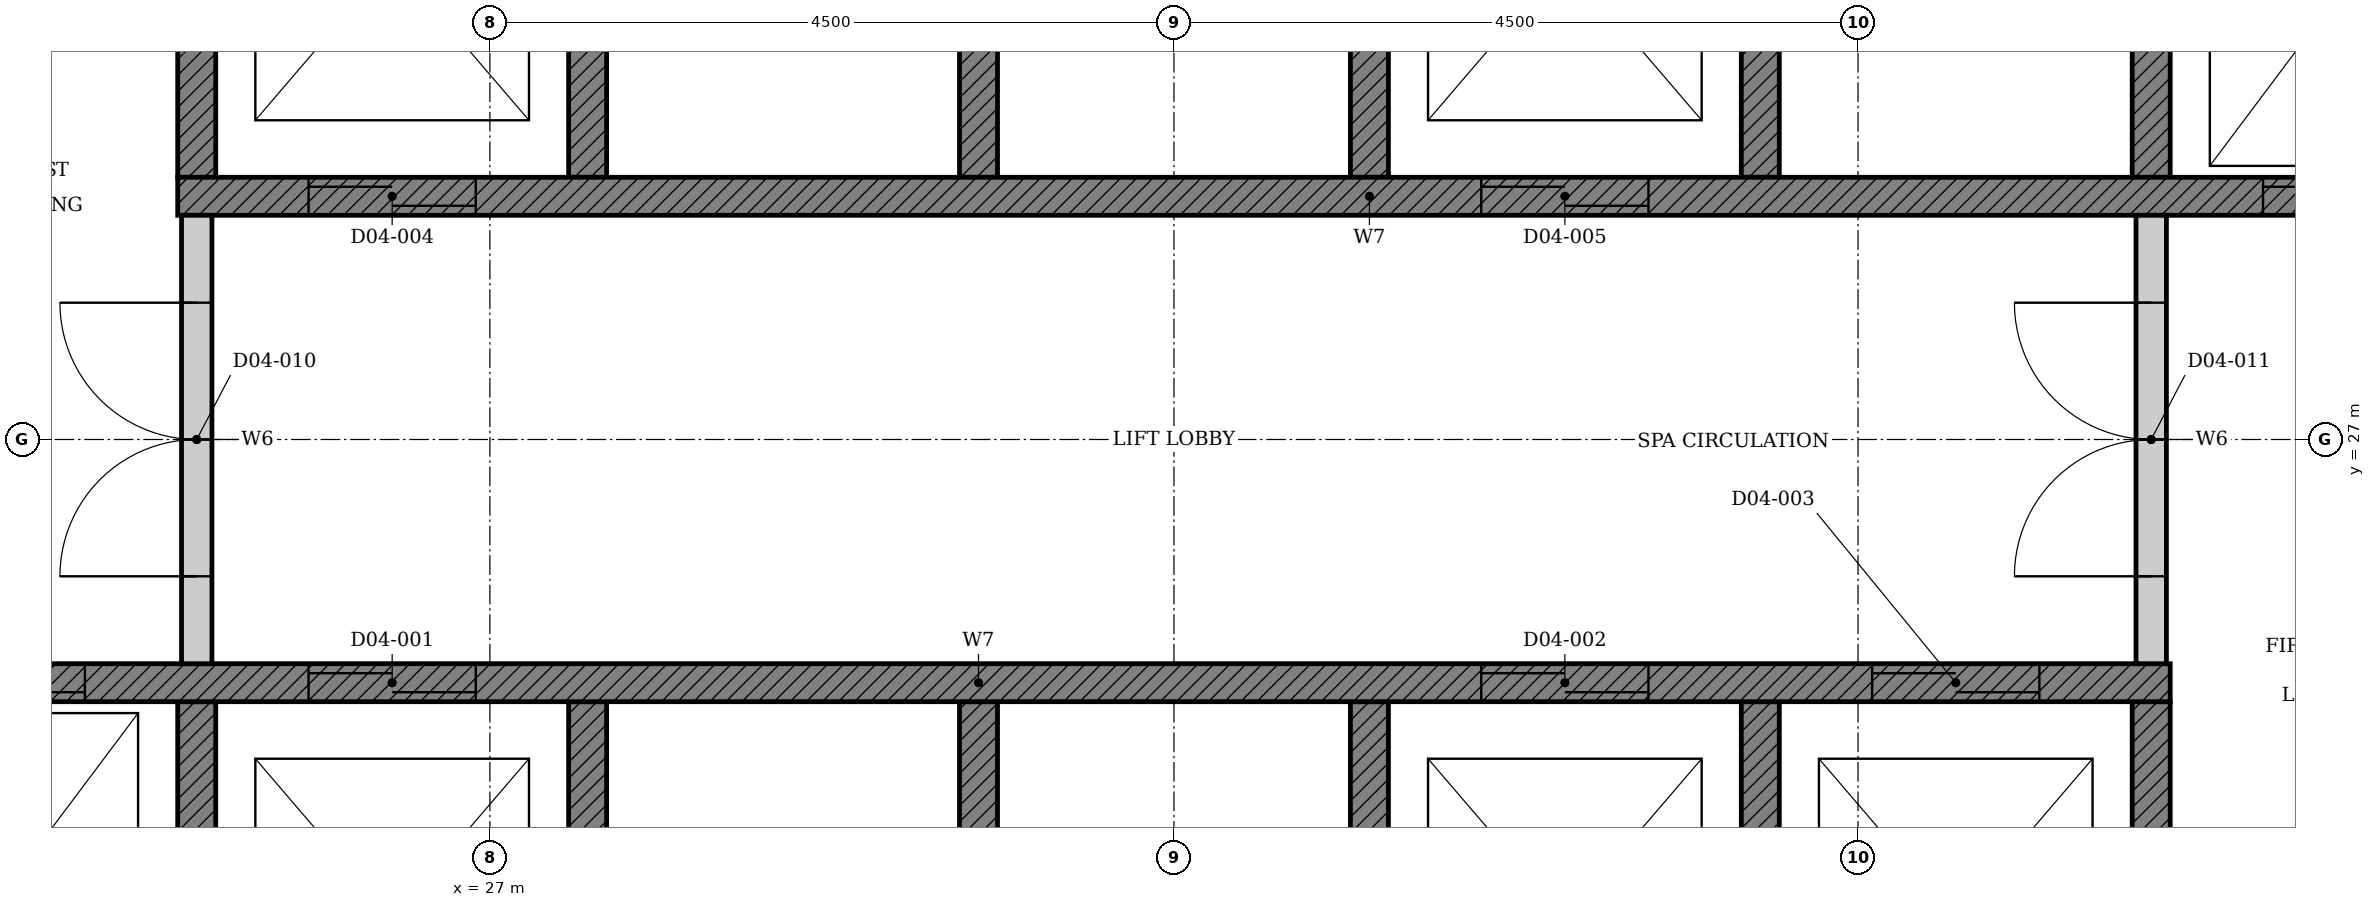
"""IFC4 building model, lengths in metres.
Left out: names, types, materials, properties, quantities, classifications, styles, units other than length and angle.
Written with IfcOpenShell. Run it as: python <this file> out.ifc"""

import sys

from ifc_helpers import new_model, si_unit, direction, frame, frame_2d, origin, place, context, subcontext, project, spatial, polyline, rectangle, outline, extrude, element, fill, save


model = new_model("IFC4")
c1 = context("Model", 3, precision=1e-05, world=origin(), true_north=direction((0.0, 1.0)))
c2 = subcontext(c1, "Body", "Model", "MODEL_VIEW")
j1 = project(units=[si_unit("LENGTHUNIT", "METRE"), si_unit("PLANEANGLEUNIT", "RADIAN")], contexts=[c1])
p1 = place(None, origin())
s1 = spatial("IfcSite", under=j1, at=p1, CompositionType="ELEMENT")
p2 = place(p1, origin())
s2 = spatial("IfcBuilding", under=s1, at=p2, CompositionType="ELEMENT")
p3 = place(p2, frame((0.0, 0.0, 24.0)))
s3 = spatial("IfcBuildingStorey", under=s2, at=p3, CompositionType="ELEMENT", Elevation=24.0)
p4 = place(p3, origin())
e1 = element("IfcWall", 1, at=p4, inside=s3, PredefinedType="SHEAR", context=c2, shape_type="SweptSolid", body=[
    extrude(outline(polyline([(22.375, 22.35), (38.053, 22.35), (38.053, 25.275), (37.803, 25.275), (37.803, 22.65), (35.482, 22.65), (35.482, 25.275), (35.232, 25.275), (35.232, 22.65), (32.911, 22.65), (32.911, 25.275), (32.661, 25.275), (32.661, 22.65), (30.339, 22.65), (30.339, 25.275), (30.089, 25.275), (30.089, 22.65), (27.768, 22.65), (27.768, 25.275), (27.518, 25.275), (27.518, 22.65), (25.197, 22.65), (25.197, 25.275), (24.947, 25.275), (24.947, 22.65), (22.625, 22.65), (22.625, 25.275), (22.375, 25.275), (22.375, 22.35)])), origin(), (0.0, 0.0, 1.0), 4.45),
])
p5 = place(p3, origin())
e2 = element("IfcWall", 2, at=p5, inside=s3, PredefinedType="SHEAR", context=c2, shape_type="SweptSolid", body=[
    extrude(outline(polyline([(24.947, 28.725), (25.197, 28.725), (25.197, 31.35), (27.518, 31.35), (27.518, 28.725), (27.768, 28.725), (27.768, 31.35), (30.089, 31.35), (30.089, 28.725), (30.339, 28.725), (30.339, 31.35), (32.661, 31.35), (32.661, 28.725), (32.911, 28.725), (32.911, 31.35), (35.232, 31.35), (35.232, 28.725), (35.482, 28.725), (35.482, 31.35), (37.803, 31.35), (37.803, 28.725), (38.053, 28.725), (38.053, 31.35), (40.375, 31.35), (40.375, 28.725), (40.625, 28.725), (40.625, 31.65), (24.947, 31.65), (24.947, 28.725)])), origin(), (0.0, 0.0, 1.0), 4.45),
])
p6 = place(p3, frame((22.375, 25.4, 0.0), z_axis=(0.0, 0.0, 1.0), x_axis=(1.0, 0.0, 0.0)))
e3 = element("IfcWall", 3, at=p6, inside=s3, PredefinedType="SHEAR", context=c2, shape_type="SweptSolid", body=[
    extrude(rectangle(XDim=15.678, YDim=0.25, at=frame_2d((7.839, 0.0))), origin(), (0.0, 0.0, 1.0), 4.45),
])
p7 = place(p6, frame((3.432, 0.0, 0.0)))
e4 = element("IfcOpeningElement", 4, at=p7, cuts=e3, PredefinedType="OPENING", context=c2, shape_type="SweptSolid", body=[
    extrude(rectangle(XDim=1.1, YDim=2.1, at=frame_2d((0.55, 1.05))), frame((0.0, 0.135, 0.0), z_axis=(0.0, -1.0, 0.0), x_axis=(1.0, 0.0, 0.0)), (0.0, 0.0, 1.0), 0.27),
])
p8 = place(p6, frame((11.146, 0.0, 0.0)))
e5 = element("IfcOpeningElement", 5, at=p8, cuts=e3, PredefinedType="OPENING", context=c2, shape_type="SweptSolid", body=[
    extrude(rectangle(XDim=1.1, YDim=2.1, at=frame_2d((0.55, 1.05))), frame((0.0, 0.135, 0.0), z_axis=(0.0, -1.0, 0.0), x_axis=(1.0, 0.0, 0.0)), (0.0, 0.0, 1.0), 0.27),
])
p9 = place(p6, frame((13.718, 0.0, 0.0)))
e6 = element("IfcOpeningElement", 6, at=p9, cuts=e3, PredefinedType="OPENING", context=c2, shape_type="SweptSolid", body=[
    extrude(rectangle(XDim=1.1, YDim=2.1, at=frame_2d((0.55, 1.05))), frame((0.0, 0.135, 0.0), z_axis=(0.0, -1.0, 0.0), x_axis=(1.0, 0.0, 0.0)), (0.0, 0.0, 1.0), 0.27),
])
p10 = place(p6, frame((0.861, 0.0, 0.0)))
e7 = element("IfcOpeningElement", 7, at=p10, cuts=e3, PredefinedType="OPENING", context=c2, shape_type="SweptSolid", body=[
    extrude(rectangle(XDim=1.1, YDim=2.1, at=frame_2d((0.55, 1.05))), frame((0.0, 0.135, 0.0), z_axis=(0.0, -1.0, 0.0), x_axis=(1.0, 0.0, 0.0)), (0.0, 0.0, 1.0), 0.27),
])
p11 = place(p3, frame((24.947, 28.6, 0.0), z_axis=(0.0, 0.0, 1.0), x_axis=(1.0, 0.0, 0.0)))
e8 = element("IfcWall", 8, at=p11, inside=s3, PredefinedType="SHEAR", context=c2, shape_type="SweptSolid", body=[
    extrude(rectangle(XDim=15.678, YDim=0.25, at=frame_2d((7.839, 0.0))), origin(), (0.0, 0.0, 1.0), 4.45),
])
p12 = place(p11, frame((0.861, 0.0, 0.0)))
e9 = element("IfcOpeningElement", 9, at=p12, cuts=e8, PredefinedType="OPENING", context=c2, shape_type="SweptSolid", body=[
    extrude(rectangle(XDim=1.1, YDim=2.1, at=frame_2d((0.55, 1.05))), frame((0.0, 0.135, 0.0), z_axis=(0.0, -1.0, 0.0), x_axis=(1.0, 0.0, 0.0)), (0.0, 0.0, 1.0), 0.27),
])
p13 = place(p11, frame((8.575, 0.0, 0.0)))
e10 = element("IfcOpeningElement", 10, at=p13, cuts=e8, PredefinedType="OPENING", context=c2, shape_type="SweptSolid", body=[
    extrude(rectangle(XDim=1.1, YDim=2.1, at=frame_2d((0.55, 1.05))), frame((0.0, 0.135, 0.0), z_axis=(0.0, -1.0, 0.0), x_axis=(1.0, 0.0, 0.0)), (0.0, 0.0, 1.0), 0.27),
])
p14 = place(p11, frame((13.718, 0.0, 0.0)))
e11 = element("IfcOpeningElement", 11, at=p14, cuts=e8, PredefinedType="OPENING", context=c2, shape_type="SweptSolid", body=[
    extrude(rectangle(XDim=1.1, YDim=2.1, at=frame_2d((0.55, 1.05))), frame((0.0, 0.135, 0.0), z_axis=(0.0, -1.0, 0.0), x_axis=(1.0, 0.0, 0.0)), (0.0, 0.0, 1.0), 0.27),
])
p15 = place(p3, frame((25.072, 25.525, 0.0), z_axis=(0.0, 0.0, 1.0), x_axis=(0.0, 1.0, 0.0)))
e12 = element("IfcWall", 12, at=p15, inside=s3, PredefinedType="PARTITIONING", context=c2, shape_type="SweptSolid", body=[
    extrude(rectangle(XDim=2.95, YDim=0.2, at=frame_2d((1.475, 0.0))), origin(), (0.0, 0.0, 1.0), 4.45),
])
p16 = place(p15, frame((0.575, 0.0, 0.0)))
e13 = element("IfcOpeningElement", 13, at=p16, cuts=e12, PredefinedType="OPENING", context=c2, shape_type="SweptSolid", body=[
    extrude(rectangle(XDim=1.8, YDim=2.1, at=frame_2d((0.9, 1.05))), frame((0.0, 0.11, 0.0), z_axis=(0.0, -1.0, 0.0), x_axis=(1.0, 0.0, 0.0)), (0.0, 0.0, 1.0), 0.22),
])
p17 = place(p3, frame((37.928, 25.525, 0.0), z_axis=(0.0, 0.0, 1.0), x_axis=(0.0, 1.0, 0.0)))
e14 = element("IfcWall", 14, at=p17, inside=s3, PredefinedType="PARTITIONING", context=c2, shape_type="SweptSolid", body=[
    extrude(rectangle(XDim=2.95, YDim=0.2, at=frame_2d((1.475, 0.0))), origin(), (0.0, 0.0, 1.0), 4.45),
])
p18 = place(p17, frame((0.575, 0.0, 0.0)))
e15 = element("IfcOpeningElement", 15, at=p18, cuts=e14, PredefinedType="OPENING", context=c2, shape_type="SweptSolid", body=[
    extrude(rectangle(XDim=1.8, YDim=2.1, at=frame_2d((0.9, 1.05))), frame((0.0, 0.11, 0.0), z_axis=(0.0, -1.0, 0.0), x_axis=(1.0, 0.0, 0.0)), (0.0, 0.0, 1.0), 0.22),
])
p19 = place(p7, origin())
e16 = element("IfcDoor", 16, at=p19, inside=s3, OperationType="DOUBLE_DOOR_SLIDING", PredefinedType="DOOR", context=c2, shape_type="SweptSolid", body=[
    extrude(rectangle(XDim=1.1, YDim=2.1, at=frame_2d((0.55, 1.05))), frame((0.0, 0.025, 0.0), z_axis=(0.0, -1.0, 0.0), x_axis=(1.0, 0.0, 0.0)), (0.0, 0.0, 1.0), 0.05),
])
fill(e4, e16)
p20 = place(p8, origin())
e17 = element("IfcDoor", 17, at=p20, inside=s3, OperationType="DOUBLE_DOOR_SLIDING", PredefinedType="DOOR", context=c2, shape_type="SweptSolid", body=[
    extrude(rectangle(XDim=1.1, YDim=2.1, at=frame_2d((0.55, 1.05))), frame((0.0, 0.025, 0.0), z_axis=(0.0, -1.0, 0.0), x_axis=(1.0, 0.0, 0.0)), (0.0, 0.0, 1.0), 0.05),
])
fill(e5, e17)
p21 = place(p9, origin())
e18 = element("IfcDoor", 18, at=p21, inside=s3, OperationType="DOUBLE_DOOR_SLIDING", PredefinedType="DOOR", context=c2, shape_type="SweptSolid", body=[
    extrude(rectangle(XDim=1.1, YDim=2.1, at=frame_2d((0.55, 1.05))), frame((0.0, 0.025, 0.0), z_axis=(0.0, -1.0, 0.0), x_axis=(1.0, 0.0, 0.0)), (0.0, 0.0, 1.0), 0.05),
])
fill(e6, e18)
p22 = place(p12, origin())
e19 = element("IfcDoor", 19, at=p22, inside=s3, OperationType="DOUBLE_DOOR_SLIDING", PredefinedType="DOOR", context=c2, shape_type="SweptSolid", body=[
    extrude(rectangle(XDim=1.1, YDim=2.1, at=frame_2d((0.55, 1.05))), frame((0.0, 0.025, 0.0), z_axis=(0.0, -1.0, 0.0), x_axis=(1.0, 0.0, 0.0)), (0.0, 0.0, 1.0), 0.05),
])
fill(e9, e19)
p23 = place(p13, origin())
e20 = element("IfcDoor", 20, at=p23, inside=s3, OperationType="DOUBLE_DOOR_SLIDING", PredefinedType="DOOR", context=c2, shape_type="SweptSolid", body=[
    extrude(rectangle(XDim=1.1, YDim=2.1, at=frame_2d((0.55, 1.05))), frame((0.0, 0.025, 0.0), z_axis=(0.0, -1.0, 0.0), x_axis=(1.0, 0.0, 0.0)), (0.0, 0.0, 1.0), 0.05),
])
fill(e10, e20)
p24 = place(p10, origin())
e21 = element("IfcDoor", 21, at=p24, inside=s3, OperationType="DOUBLE_DOOR_SLIDING", PredefinedType="DOOR", context=c2, shape_type="SweptSolid", body=[
    extrude(rectangle(XDim=1.1, YDim=2.1, at=frame_2d((0.55, 1.05))), frame((0.0, 0.025, 0.0), z_axis=(0.0, -1.0, 0.0), x_axis=(1.0, 0.0, 0.0)), (0.0, 0.0, 1.0), 0.05),
])
fill(e7, e21)
p25 = place(p14, origin())
e22 = element("IfcDoor", 22, at=p25, inside=s3, OperationType="DOUBLE_DOOR_SLIDING", PredefinedType="DOOR", context=c2, shape_type="SweptSolid", body=[
    extrude(rectangle(XDim=1.1, YDim=2.1, at=frame_2d((0.55, 1.05))), frame((0.0, 0.025, 0.0), z_axis=(0.0, -1.0, 0.0), x_axis=(1.0, 0.0, 0.0)), (0.0, 0.0, 1.0), 0.05),
])
fill(e11, e22)
p26 = place(p16, origin())
e23 = element("IfcDoor", 23, at=p26, inside=s3, OperationType="DOUBLE_DOOR_SINGLE_SWING", PredefinedType="DOOR", context=c2, shape_type="SweptSolid", body=[
    extrude(rectangle(XDim=1.8, YDim=2.1, at=frame_2d((0.9, 1.05))), frame((0.0, 0.025, 0.0), z_axis=(0.0, -1.0, 0.0), x_axis=(1.0, 0.0, 0.0)), (0.0, 0.0, 1.0), 0.05),
])
fill(e13, e23)
p27 = place(p18, origin())
e24 = element("IfcDoor", 24, at=p27, inside=s3, OperationType="DOUBLE_DOOR_SINGLE_SWING", PredefinedType="DOOR", context=c2, shape_type="SweptSolid", body=[
    extrude(rectangle(XDim=1.8, YDim=2.1, at=frame_2d((0.9, 1.05))), frame((0.0, 0.025, 0.0), z_axis=(0.0, -1.0, 0.0), x_axis=(1.0, 0.0, 0.0)), (0.0, 0.0, 1.0), 0.05),
])
fill(e15, e24)
save(model, sys.argv[1])
